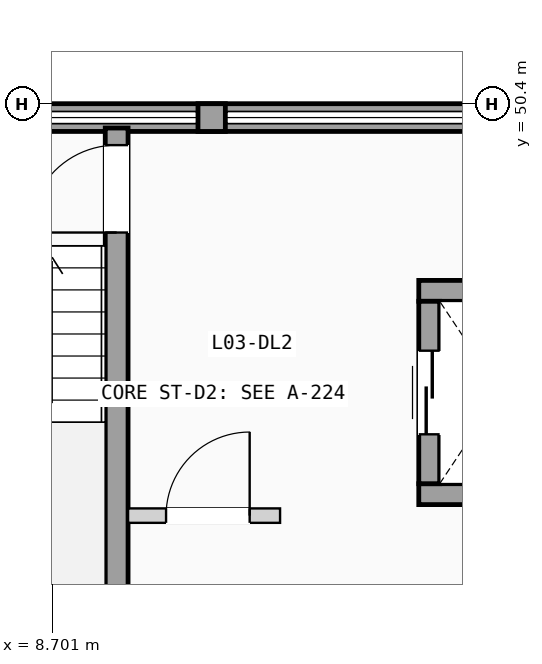
"""IFC4 building model, lengths in metres.
Left out: names, types, materials, properties, quantities, classifications, styles, units other than length and angle.
Written with IfcOpenShell. Run it as: python <this file> out.ifc"""

import sys

from ifc_helpers import new_model, si_unit, direction, frame, frame_2d, origin, place, context, subcontext, project, spatial, rectangle, extrude, element, fill, save


model = new_model("IFC4")
c1 = context("Model", 3, precision=1e-05, world=origin(), true_north=direction((0.0, 1.0)))
c2 = subcontext(c1, "Body", "Model", "MODEL_VIEW")
j1 = project(units=[si_unit("LENGTHUNIT", "METRE"), si_unit("PLANEANGLEUNIT", "RADIAN")], contexts=[c1])
p1 = place(None, origin())
s1 = spatial("IfcSite", under=j1, at=p1, CompositionType="ELEMENT")
p2 = place(p1, origin())
s2 = spatial("IfcBuilding", under=s1, at=p2, CompositionType="ELEMENT")
p3 = place(p2, frame((0.0, 0.0, 12.075)))
s3 = spatial("IfcBuildingStorey", under=s2, at=p3, CompositionType="ELEMENT", Elevation=12.075)
p4 = place(p3, frame((0.0, 50.218, 0.0), z_axis=(0.0, 0.0, 1.0), x_axis=(1.0, 0.0, 0.0)))
e1 = element("IfcWall", 1, at=p4, inside=s3, PredefinedType="SOLIDWALL", context=c2, shape_type="SweptSolid", body=[
    extrude(rectangle(XDim=21.6, YDim=0.365, at=frame_2d((10.8, 0.0))), origin(), (0.0, 0.0, 1.0), 1.11),
])
p5 = place(p3, frame((10.62, 50.218, 1.11), z_axis=(0.0, 0.0, 1.0), x_axis=(1.0, 0.0, 0.0)))
e2 = element("IfcWall", 2, at=p5, inside=s3, PredefinedType="SOLIDWALL", context=c2, shape_type="SweptSolid", body=[
    extrude(rectangle(XDim=0.36, YDim=0.365, at=frame_2d((0.18, 0.0))), origin(), (0.0, 0.0, 1.0), 1.78),
])
p6 = place(p3, frame((9.55, 43.08, 0.0), z_axis=(0.0, 0.0, 1.0), x_axis=(0.0, 1.0, 0.0)))
e3 = element("IfcWall", 3, at=p6, inside=s3, PredefinedType="SHEAR", context=c2, shape_type="SweptSolid", body=[
    extrude(rectangle(XDim=7.0, YDim=0.3, at=frame_2d((3.5, 0.0))), origin(), (0.0, 0.0, 1.0), 2.89),
])
p7 = place(p6, frame((5.625, 0.0, 0.0)))
e4 = element("IfcOpeningElement", 4, at=p7, cuts=e3, PredefinedType="OPENING", context=c2, shape_type="SweptSolid", body=[
    extrude(rectangle(XDim=1.15, YDim=2.12, at=frame_2d((0.575, 1.06))), frame((0.0, 0.16, 0.0), z_axis=(0.0, -1.0, 0.0), x_axis=(1.0, 0.0, 0.0)), (0.0, 0.0, 1.0), 0.32),
])
for number, where, z_axis, x_axis in (
    (5, (13.525, 45.262, 0.0), (0.0, 0.0, 1.0), (1.0, 0.0, 0.0)),
    (6, (13.525, 47.938, 0.0), (0.0, 0.0, 1.0), (1.0, 0.0, 0.0)),
):
    element("IfcWall", number, at=place(p3, frame(where, z_axis=z_axis, x_axis=x_axis)), inside=s3, PredefinedType="SHEAR", context=c2, shape_type="SweptSolid", body=[
        extrude(rectangle(XDim=2.15, YDim=0.275, at=frame_2d((1.075, 0.0))), origin(), (0.0, 0.0, 1.0), 2.89),
    ])
p8 = place(p3, frame((13.663, 45.4, 0.0), z_axis=(0.0, 0.0, 1.0), x_axis=(0.0, 1.0, 0.0)))
e7 = element("IfcWall", 7, at=p8, inside=s3, PredefinedType="SHEAR", context=c2, shape_type="SweptSolid", body=[
    extrude(rectangle(XDim=2.4, YDim=0.275, at=frame_2d((1.2, 0.0))), origin(), (0.0, 0.0, 1.0), 2.89),
])
p9 = place(p8, frame((0.65, 0.0, 0.0)))
e8 = element("IfcOpeningElement", 8, at=p9, cuts=e7, PredefinedType="OPENING", context=c2, shape_type="SweptSolid", body=[
    extrude(rectangle(XDim=1.1, YDim=2.15, at=frame_2d((0.55, 1.075))), frame((0.0, 0.147, 0.0), z_axis=(0.0, -1.0, 0.0), x_axis=(1.0, 0.0, 0.0)), (0.0, 0.0, 1.0), 0.295),
])
p10 = place(p3, frame((9.7, 44.98, 0.0), z_axis=(0.0, 0.0, 1.0), x_axis=(1.0, 0.0, 0.0)))
e9 = element("IfcWall", 9, at=p10, inside=s3, PredefinedType="PARTITIONING", context=c2, shape_type="SweptSolid", body=[
    extrude(rectangle(XDim=2.0, YDim=0.19, at=frame_2d((1.0, 0.0))), origin(), (0.0, 0.0, 1.0), 2.87),
])
p11 = place(p10, frame((0.5, 0.0, 0.0)))
e10 = element("IfcOpeningElement", 10, at=p11, cuts=e9, PredefinedType="OPENING", context=c2, shape_type="SweptSolid", body=[
    extrude(rectangle(XDim=1.1, YDim=2.12, at=frame_2d((0.55, 1.06))), frame((0.0, 0.105, 0.0), z_axis=(0.0, -1.0, 0.0), x_axis=(1.0, 0.0, 0.0)), (0.0, 0.0, 1.0), 0.21),
])
p12 = place(p7, origin())
e11 = element("IfcDoor", 11, at=p12, inside=s3, OperationType="SINGLE_SWING_LEFT", PredefinedType="DOOR", context=c2, shape_type="SweptSolid", body=[
    extrude(rectangle(XDim=1.15, YDim=2.12, at=frame_2d((0.575, 1.06))), frame((0.0, 0.025, 0.0), z_axis=(0.0, -1.0, 0.0), x_axis=(1.0, 0.0, 0.0)), (0.0, 0.0, 1.0), 0.05),
])
fill(e4, e11)
p13 = place(p9, origin())
e12 = element("IfcDoor", 12, at=p13, inside=s3, OperationType="SLIDING_TO_LEFT", PredefinedType="DOOR", context=c2, shape_type="SweptSolid", body=[
    extrude(rectangle(XDim=1.1, YDim=2.15, at=frame_2d((0.55, 1.075))), frame((0.0, 0.025, 0.0), z_axis=(0.0, -1.0, 0.0), x_axis=(1.0, 0.0, 0.0)), (0.0, 0.0, 1.0), 0.05),
])
fill(e8, e12)
p14 = place(p11, origin())
e13 = element("IfcDoor", 13, at=p14, inside=s3, OperationType="SINGLE_SWING_RIGHT", PredefinedType="DOOR", context=c2, shape_type="SweptSolid", body=[
    extrude(rectangle(XDim=1.1, YDim=2.12, at=frame_2d((0.55, 1.06))), frame((0.0, 0.025, 0.0), z_axis=(0.0, -1.0, 0.0), x_axis=(1.0, 0.0, 0.0)), (0.0, 0.0, 1.0), 0.05),
])
fill(e10, e13)
save(model, sys.argv[1])
